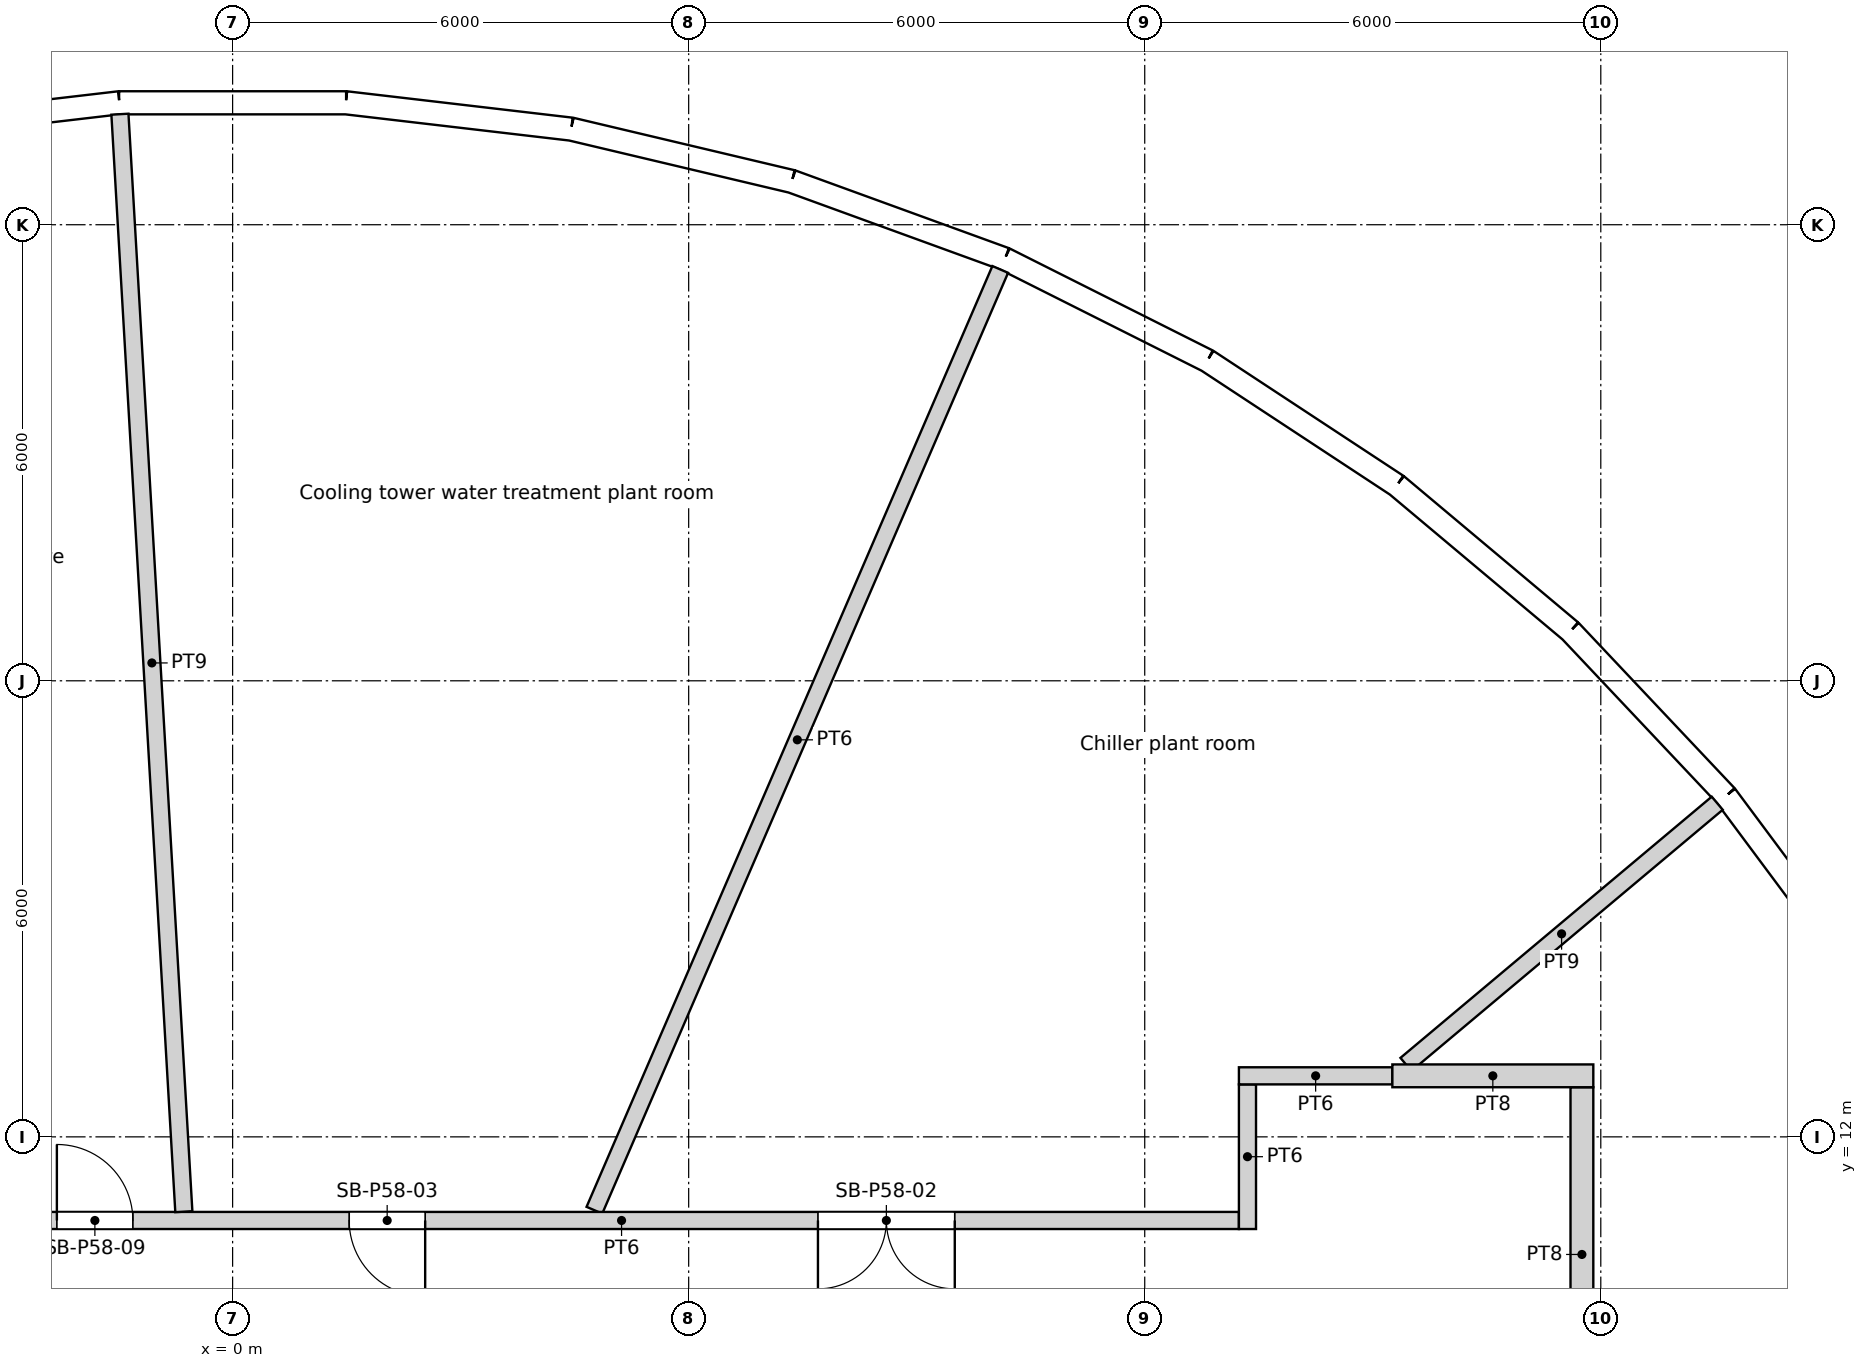
"""IFC4 building model, lengths in metres.
Left out: names, types, materials, properties, quantities, classifications, styles, units other than length and angle.
Written with IfcOpenShell. Run it as: python <this file> out.ifc"""

import sys

from ifc_helpers import new_model, si_unit, direction, frame, frame_2d, origin, origin_2d, place, context, subcontext, project, spatial, rectangle, circle, extrude, element, fill, save


model = new_model("IFC4")
c1 = context("Model", 3, precision=1e-05, world=origin(), true_north=direction((0.0, 1.0)))
c2 = subcontext(c1, "Body", "Model", "MODEL_VIEW")
j1 = project(units=[si_unit("LENGTHUNIT", "METRE"), si_unit("PLANEANGLEUNIT", "RADIAN")], contexts=[c1])
p1 = place(None, origin())
s1 = spatial("IfcSite", under=j1, at=p1, CompositionType="ELEMENT")
p2 = place(p1, origin())
s2 = spatial("IfcBuilding", under=s1, at=p2, CompositionType="ELEMENT")
p3 = place(p2, frame((0.0, 0.0, 225.0)))
s3 = spatial("IfcBuildingStorey", under=s2, at=p3, CompositionType="ELEMENT", Elevation=225.0)
for number, where, z_axis, x_axis in (
    (1, (18.805, 15.779, 0.0), (0.0, 0.0, 1.0), (1.0, 0.0, 0.0)),
    (2, (14.659, 19.69, 0.0), (0.0, 0.0, 1.0), (1.0, 0.0, 0.0)),
    (3, (9.723, 22.54, 0.0), (0.0, 0.0, 1.0), (1.0, 0.0, 0.0)),
    (4, (4.263, 24.175, 0.0), (0.0, 0.0, 1.0), (1.0, 0.0, 0.0)),
    (5, (-1.427, 24.506, 0.0), (0.0, 0.0, 1.0), (1.0, 0.0, 0.0)),
):
    element("IfcColumn", number, at=place(p3, frame(where, z_axis=z_axis, x_axis=x_axis)), inside=s3, PredefinedType="COLUMN", context=c2, shape_type="SweptSolid", body=[
        extrude(circle(Radius=0.6, at=origin_2d()), origin(), (0.0, 0.0, 1.0), 6.0),
    ])
for number, where, z_axis, x_axis in (
    (6, (15.552, 10.603, 0.0), (0.0, 0.0, 1.0), (1.0, 0.0, 0.0)),
    (7, (11.735, 14.716, 0.0), (0.0, 0.0, 1.0), (1.0, 0.0, 0.0)),
    (8, (6.876, 17.521, 0.0), (0.0, 0.0, 1.0), (1.0, 0.0, 0.0)),
    (9, (1.406, 18.77, 0.0), (0.0, 0.0, 1.0), (1.0, 0.0, 0.0)),
):
    element("IfcColumn", number, at=place(p3, frame(where, z_axis=z_axis, x_axis=x_axis)), inside=s3, PredefinedType="COLUMN", context=c2, shape_type="SweptSolid", body=[
        extrude(circle(Radius=0.65, at=origin_2d()), origin(), (0.0, 0.0, 1.0), 6.0),
    ])
p4 = place(p3, frame((21.428, 14.094, 0.0), z_axis=(0.0, 0.0, 1.0), x_axis=(-0.597206768034, 0.802087324557, 0.0)))
e10 = element("IfcWall", 10, at=p4, inside=s3, PredefinedType="SOLIDWALL", context=c2, shape_type="SweptSolid", body=[
    extrude(rectangle(XDim=2.983, YDim=0.3, at=frame_2d((1.491, 0.0))), origin(), (0.0, 0.0, 1.0), 5.65),
])
p5 = place(p4, frame((1.491, 0.0, 1.825)))
e11 = element("IfcOpeningElement", 11, at=p5, cuts=e10, PredefinedType="OPENING", context=c2, shape_type="SweptSolid", body=[
    extrude(circle(Radius=1.2, at=origin_2d()), frame((0.0, 0.16, 0.0), z_axis=(0.0, -1.0, 0.0), x_axis=(1.0, 0.0, 0.0)), (0.0, 0.0, 1.0), 0.32),
])
p6 = place(p3, frame((19.647, 16.486, 0.0), z_axis=(0.0, 0.0, 1.0), x_axis=(-0.686219609698, 0.72739442345, 0.0)))
e12 = element("IfcWall", 12, at=p6, inside=s3, PredefinedType="SOLIDWALL", context=c2, shape_type="SweptSolid", body=[
    extrude(rectangle(XDim=2.982, YDim=0.3, at=frame_2d((1.491, 0.0))), origin(), (0.0, 0.0, 1.0), 5.65),
])
p7 = place(p6, frame((1.491, 0.0, 1.825)))
e13 = element("IfcOpeningElement", 13, at=p7, cuts=e12, PredefinedType="OPENING", context=c2, shape_type="SweptSolid", body=[
    extrude(circle(Radius=1.2, at=origin_2d()), frame((0.0, 0.16, 0.0), z_axis=(0.0, -1.0, 0.0), x_axis=(1.0, 0.0, 0.0)), (0.0, 0.0, 1.0), 0.32),
])
p8 = place(p3, frame((17.6, 18.655, 0.0), z_axis=(0.0, 0.0, 1.0), x_axis=(-0.766015999952, 0.64282150541, 0.0)))
e14 = element("IfcWall", 14, at=p8, inside=s3, PredefinedType="SOLIDWALL", context=c2, shape_type="SweptSolid", body=[
    extrude(rectangle(XDim=2.982, YDim=0.3, at=frame_2d((1.491, 0.0))), origin(), (0.0, 0.0, 1.0), 5.65),
])
p9 = place(p8, frame((1.491, 0.0, 1.825)))
e15 = element("IfcOpeningElement", 15, at=p9, cuts=e14, PredefinedType="OPENING", context=c2, shape_type="SweptSolid", body=[
    extrude(circle(Radius=1.2, at=origin_2d()), frame((0.0, 0.16, 0.0), z_axis=(0.0, -1.0, 0.0), x_axis=(1.0, 0.0, 0.0)), (0.0, 0.0, 1.0), 0.32),
])
p10 = place(p3, frame((15.316, 20.573, 0.0), z_axis=(0.0, 0.0, 1.0), x_axis=(-0.835497187922, 0.549494721517, 0.0)))
e16 = element("IfcWall", 16, at=p10, inside=s3, PredefinedType="SOLIDWALL", context=c2, shape_type="SweptSolid", body=[
    extrude(rectangle(XDim=2.983, YDim=0.3, at=frame_2d((1.491, 0.0))), origin(), (0.0, 0.0, 1.0), 5.65),
])
p11 = place(p10, frame((1.491, 0.0, 1.825)))
e17 = element("IfcOpeningElement", 17, at=p11, cuts=e16, PredefinedType="OPENING", context=c2, shape_type="SweptSolid", body=[
    extrude(circle(Radius=1.2, at=origin_2d()), frame((0.0, 0.16, 0.0), z_axis=(0.0, -1.0, 0.0), x_axis=(1.0, 0.0, 0.0)), (0.0, 0.0, 1.0), 0.32),
])
p12 = place(p3, frame((12.824, 22.211, 0.0), z_axis=(0.0, 0.0, 1.0), x_axis=(-0.893656390984, 0.448751885626, 0.0)))
e18 = element("IfcWall", 18, at=p12, inside=s3, PredefinedType="SOLIDWALL", context=c2, shape_type="SweptSolid", body=[
    extrude(rectangle(XDim=2.982, YDim=0.3, at=frame_2d((1.491, 0.0))), origin(), (0.0, 0.0, 1.0), 5.65),
])
p13 = place(p12, frame((1.491, 0.0, 1.825)))
e19 = element("IfcOpeningElement", 19, at=p13, cuts=e18, PredefinedType="OPENING", context=c2, shape_type="SweptSolid", body=[
    extrude(circle(Radius=1.2, at=origin_2d()), frame((0.0, 0.16, 0.0), z_axis=(0.0, -1.0, 0.0), x_axis=(1.0, 0.0, 0.0)), (0.0, 0.0, 1.0), 0.32),
])
p14 = place(p3, frame((10.158, 23.55, 0.0), z_axis=(0.0, 0.0, 1.0), x_axis=(-0.939676264274, 0.342065079129, 0.0)))
e20 = element("IfcWall", 20, at=p14, inside=s3, PredefinedType="SOLIDWALL", context=c2, shape_type="SweptSolid", body=[
    extrude(rectangle(XDim=2.983, YDim=0.3, at=frame_2d((1.491, 0.0))), origin(), (0.0, 0.0, 1.0), 5.65),
])
p15 = place(p14, frame((1.491, 0.0, 1.825)))
e21 = element("IfcOpeningElement", 21, at=p15, cuts=e20, PredefinedType="OPENING", context=c2, shape_type="SweptSolid", body=[
    extrude(circle(Radius=1.2, at=origin_2d()), frame((0.0, 0.16, 0.0), z_axis=(0.0, -1.0, 0.0), x_axis=(1.0, 0.0, 0.0)), (0.0, 0.0, 1.0), 0.32),
])
p16 = place(p3, frame((7.356, 24.57, 0.0), z_axis=(0.0, 0.0, 1.0), x_axis=(-0.973049843813, 0.230594886012, 0.0)))
e22 = element("IfcWall", 22, at=p16, inside=s3, PredefinedType="SOLIDWALL", context=c2, shape_type="SweptSolid", body=[
    extrude(rectangle(XDim=2.982, YDim=0.3, at=frame_2d((1.491, 0.0))), origin(), (0.0, 0.0, 1.0), 5.65),
])
p17 = place(p16, frame((1.491, 0.0, 1.825)))
e23 = element("IfcOpeningElement", 23, at=p17, cuts=e22, PredefinedType="OPENING", context=c2, shape_type="SweptSolid", body=[
    extrude(circle(Radius=1.2, at=origin_2d()), frame((0.0, 0.16, 0.0), z_axis=(0.0, -1.0, 0.0), x_axis=(1.0, 0.0, 0.0)), (0.0, 0.0, 1.0), 0.32),
])
p18 = place(p3, frame((4.454, 25.258, 0.0), z_axis=(0.0, 0.0, 1.0), x_axis=(-0.993240822844, 0.116071821888, 0.0)))
e24 = element("IfcWall", 24, at=p18, inside=s3, PredefinedType="SOLIDWALL", context=c2, shape_type="SweptSolid", body=[
    extrude(rectangle(XDim=2.983, YDim=0.3, at=frame_2d((1.491, 0.0))), origin(), (0.0, 0.0, 1.0), 5.65),
])
p19 = place(p18, frame((1.491, 0.0, 1.825)))
e25 = element("IfcOpeningElement", 25, at=p19, cuts=e24, PredefinedType="OPENING", context=c2, shape_type="SweptSolid", body=[
    extrude(circle(Radius=1.2, at=origin_2d()), frame((0.0, 0.16, 0.0), z_axis=(0.0, -1.0, 0.0), x_axis=(1.0, 0.0, 0.0)), (0.0, 0.0, 1.0), 0.32),
])
p20 = place(p3, frame((1.491, 25.604, 0.0), z_axis=(0.0, 0.0, 1.0), x_axis=(-1.0, 0.0, 0.0)))
e26 = element("IfcWall", 26, at=p20, inside=s3, PredefinedType="SOLIDWALL", context=c2, shape_type="SweptSolid", body=[
    extrude(rectangle(XDim=2.982, YDim=0.3, at=frame_2d((1.491, 0.0))), origin(), (0.0, 0.0, 1.0), 5.65),
])
p21 = place(p20, frame((1.491, 0.0, 1.825)))
e27 = element("IfcOpeningElement", 27, at=p21, cuts=e26, PredefinedType="OPENING", context=c2, shape_type="SweptSolid", body=[
    extrude(circle(Radius=1.2, at=origin_2d()), frame((0.0, 0.16, 0.0), z_axis=(0.0, -1.0, 0.0), x_axis=(1.0, 0.0, 0.0)), (0.0, 0.0, 1.0), 0.32),
])
p22 = place(p3, frame((-1.491, 25.604, 0.0), z_axis=(0.0, 0.0, 1.0), x_axis=(-0.993240822844, -0.116071821888, 0.0)))
e28 = element("IfcWall", 28, at=p22, inside=s3, PredefinedType="SOLIDWALL", context=c2, shape_type="SweptSolid", body=[
    extrude(rectangle(XDim=2.983, YDim=0.3, at=frame_2d((1.491, 0.0))), origin(), (0.0, 0.0, 1.0), 5.65),
])
p23 = place(p22, frame((1.491, 0.0, 1.825)))
e29 = element("IfcOpeningElement", 29, at=p23, cuts=e28, PredefinedType="OPENING", context=c2, shape_type="SweptSolid", body=[
    extrude(circle(Radius=1.2, at=origin_2d()), frame((0.0, 0.16, 0.0), z_axis=(0.0, -1.0, 0.0), x_axis=(1.0, 0.0, 0.0)), (0.0, 0.0, 1.0), 0.32),
])
p24 = place(p3, frame((-1.482, 25.454, 0.0), z_axis=(0.0, 0.0, 1.0), x_axis=(0.058137182414, -0.9983086036, 0.0)))
e30 = element("IfcWall", 30, at=p24, inside=s3, PredefinedType="PARTITIONING", context=c2, shape_type="SweptSolid", body=[
    extrude(rectangle(XDim=14.463, YDim=0.225, at=frame_2d((7.231, 0.0))), origin(), (0.0, 0.0, 1.0), 2.7),
])
p25 = place(p3, frame((10.099, 23.412, 0.0), z_axis=(0.0, 0.0, 1.0), x_axis=(-0.396077936738, -0.918216895961, 0.0)))
e31 = element("IfcWall", 31, at=p25, inside=s3, PredefinedType="PARTITIONING", context=c2, shape_type="SweptSolid", body=[
    extrude(rectangle(XDim=13.479, YDim=0.225, at=frame_2d((6.74, 0.0))), origin(), (0.0, 0.0, 1.0), 5.2),
])
p26 = place(p3, frame((13.239, 10.9, 0.0), z_axis=(0.0, 0.0, 1.0), x_axis=(-1.0, 0.0, 0.0)))
e32 = element("IfcWall", 32, at=p26, inside=s3, PredefinedType="PARTITIONING", context=c2, shape_type="SweptSolid", body=[
    extrude(rectangle(XDim=16.228, YDim=0.225, at=frame_2d((8.114, 0.0))), origin(), (0.0, 0.0, 1.0), 5.2),
])
p27 = place(p26, frame((3.738, 0.0, 0.0)))
e33 = element("IfcOpeningElement", 33, at=p27, cuts=e32, PredefinedType="OPENING", context=c2, shape_type="SweptSolid", body=[
    extrude(rectangle(XDim=1.8, YDim=2.4, at=frame_2d((0.9, 1.2))), frame((0.0, 0.113, 0.0), z_axis=(0.0, -1.0, 0.0), x_axis=(1.0, 0.0, 0.0)), (0.0, 0.0, 1.0), 0.225),
])
p28 = place(p26, frame((10.706, 0.0, 0.0)))
e34 = element("IfcOpeningElement", 34, at=p28, cuts=e32, PredefinedType="OPENING", context=c2, shape_type="SweptSolid", body=[
    extrude(rectangle(XDim=1.0, YDim=2.1, at=frame_2d((0.5, 1.05))), frame((0.0, 0.113, 0.0), z_axis=(0.0, -1.0, 0.0), x_axis=(1.0, 0.0, 0.0)), (0.0, 0.0, 1.0), 0.225),
])
p29 = place(p26, frame((14.551, 0.0, 0.0)))
e35 = element("IfcOpeningElement", 35, at=p29, cuts=e32, PredefinedType="OPENING", context=c2, shape_type="SweptSolid", body=[
    extrude(rectangle(XDim=1.0, YDim=2.1, at=frame_2d((0.5, 1.05))), frame((0.0, 0.113, 0.0), z_axis=(0.0, -1.0, 0.0), x_axis=(1.0, 0.0, 0.0)), (0.0, 0.0, 1.0), 0.225),
])
p30 = place(p3, frame((13.352, 12.69, 0.0), z_axis=(0.0, 0.0, 1.0), x_axis=(0.0, -1.0, 0.0)))
e36 = element("IfcWall", 36, at=p30, inside=s3, PredefinedType="PARTITIONING", context=c2, shape_type="SweptSolid", body=[
    extrude(rectangle(XDim=1.903, YDim=0.225, at=frame_2d((0.951, 0.0))), origin(), (0.0, 0.0, 1.0), 5.2),
])
p31 = place(p3, frame((15.258, 12.803, 0.0), z_axis=(0.0, 0.0, 1.0), x_axis=(-1.0, 0.0, 0.0)))
e37 = element("IfcWall", 37, at=p31, inside=s3, PredefinedType="PARTITIONING", context=c2, shape_type="SweptSolid", body=[
    extrude(rectangle(XDim=2.019, YDim=0.225, at=frame_2d((1.009, 0.0))), origin(), (0.0, 0.0, 1.0), 5.2),
])
p32 = place(p3, frame((17.752, 8.253, 0.0), z_axis=(0.0, 0.0, 1.0), x_axis=(0.0, 1.0, 0.0)))
e38 = element("IfcWall", 38, at=p32, inside=s3, PredefinedType="PARTITIONING", context=c2, shape_type="SweptSolid", body=[
    extrude(rectangle(XDim=4.4, YDim=0.3, at=frame_2d((2.2, 0.0))), origin(), (0.0, 0.0, 1.0), 5.2),
])
p33 = place(p3, frame((17.902, 12.803, 0.0), z_axis=(0.0, 0.0, 1.0), x_axis=(-1.0, 0.0, 0.0)))
e39 = element("IfcWall", 39, at=p33, inside=s3, PredefinedType="PARTITIONING", context=c2, shape_type="SweptSolid", body=[
    extrude(rectangle(XDim=2.644, YDim=0.3, at=frame_2d((1.322, 0.0))), origin(), (0.0, 0.0, 1.0), 5.2),
])
p34 = place(p3, frame((19.532, 16.389, 0.0), z_axis=(0.0, 0.0, 1.0), x_axis=(-0.766023242491, -0.642812874765, 0.0)))
e40 = element("IfcWall", 40, at=p34, inside=s3, PredefinedType="PARTITIONING", context=c2, shape_type="SweptSolid", body=[
    extrude(rectangle(XDim=5.346, YDim=0.225, at=frame_2d((2.673, 0.0))), origin(), (0.0, 0.0, 1.0), 2.7),
])
p35 = place(p5, origin())
e41 = element("IfcWindow", 41, at=p35, inside=s3, PartitioningType="SINGLE_PANEL", PredefinedType="WINDOW", context=c2, shape_type="SweptSolid", body=[
    extrude(circle(Radius=1.2, at=origin_2d()), frame((0.0, 0.12, 0.0), z_axis=(0.0, -1.0, 0.0), x_axis=(1.0, 0.0, 0.0)), (0.0, 0.0, 1.0), 0.1),
])
fill(e11, e41)
p36 = place(p7, origin())
e42 = element("IfcWindow", 42, at=p36, inside=s3, PartitioningType="SINGLE_PANEL", PredefinedType="WINDOW", context=c2, shape_type="SweptSolid", body=[
    extrude(circle(Radius=1.2, at=origin_2d()), frame((0.0, 0.12, 0.0), z_axis=(0.0, -1.0, 0.0), x_axis=(1.0, 0.0, 0.0)), (0.0, 0.0, 1.0), 0.1),
])
fill(e13, e42)
p37 = place(p9, origin())
e43 = element("IfcWindow", 43, at=p37, inside=s3, PartitioningType="SINGLE_PANEL", PredefinedType="WINDOW", context=c2, shape_type="SweptSolid", body=[
    extrude(circle(Radius=1.2, at=origin_2d()), frame((0.0, 0.12, 0.0), z_axis=(0.0, -1.0, 0.0), x_axis=(1.0, 0.0, 0.0)), (0.0, 0.0, 1.0), 0.1),
])
fill(e15, e43)
p38 = place(p11, origin())
e44 = element("IfcWindow", 44, at=p38, inside=s3, PartitioningType="SINGLE_PANEL", PredefinedType="WINDOW", context=c2, shape_type="SweptSolid", body=[
    extrude(circle(Radius=1.2, at=origin_2d()), frame((0.0, 0.12, 0.0), z_axis=(0.0, -1.0, 0.0), x_axis=(1.0, 0.0, 0.0)), (0.0, 0.0, 1.0), 0.1),
])
fill(e17, e44)
p39 = place(p13, origin())
e45 = element("IfcWindow", 45, at=p39, inside=s3, PartitioningType="SINGLE_PANEL", PredefinedType="WINDOW", context=c2, shape_type="SweptSolid", body=[
    extrude(circle(Radius=1.2, at=origin_2d()), frame((0.0, 0.12, 0.0), z_axis=(0.0, -1.0, 0.0), x_axis=(1.0, 0.0, 0.0)), (0.0, 0.0, 1.0), 0.1),
])
fill(e19, e45)
p40 = place(p15, origin())
e46 = element("IfcWindow", 46, at=p40, inside=s3, PartitioningType="SINGLE_PANEL", PredefinedType="WINDOW", context=c2, shape_type="SweptSolid", body=[
    extrude(circle(Radius=1.2, at=origin_2d()), frame((0.0, 0.12, 0.0), z_axis=(0.0, -1.0, 0.0), x_axis=(1.0, 0.0, 0.0)), (0.0, 0.0, 1.0), 0.1),
])
fill(e21, e46)
p41 = place(p17, origin())
e47 = element("IfcWindow", 47, at=p41, inside=s3, PartitioningType="SINGLE_PANEL", PredefinedType="WINDOW", context=c2, shape_type="SweptSolid", body=[
    extrude(circle(Radius=1.2, at=origin_2d()), frame((0.0, 0.12, 0.0), z_axis=(0.0, -1.0, 0.0), x_axis=(1.0, 0.0, 0.0)), (0.0, 0.0, 1.0), 0.1),
])
fill(e23, e47)
p42 = place(p19, origin())
e48 = element("IfcWindow", 48, at=p42, inside=s3, PartitioningType="SINGLE_PANEL", PredefinedType="WINDOW", context=c2, shape_type="SweptSolid", body=[
    extrude(circle(Radius=1.2, at=origin_2d()), frame((0.0, 0.12, 0.0), z_axis=(0.0, -1.0, 0.0), x_axis=(1.0, 0.0, 0.0)), (0.0, 0.0, 1.0), 0.1),
])
fill(e25, e48)
p43 = place(p21, origin())
e49 = element("IfcWindow", 49, at=p43, inside=s3, PartitioningType="SINGLE_PANEL", PredefinedType="WINDOW", context=c2, shape_type="SweptSolid", body=[
    extrude(circle(Radius=1.2, at=origin_2d()), frame((0.0, 0.12, 0.0), z_axis=(0.0, -1.0, 0.0), x_axis=(1.0, 0.0, 0.0)), (0.0, 0.0, 1.0), 0.1),
])
fill(e27, e49)
p44 = place(p23, origin())
e50 = element("IfcWindow", 50, at=p44, inside=s3, PartitioningType="SINGLE_PANEL", PredefinedType="WINDOW", context=c2, shape_type="SweptSolid", body=[
    extrude(circle(Radius=1.2, at=origin_2d()), frame((0.0, 0.12, 0.0), z_axis=(0.0, -1.0, 0.0), x_axis=(1.0, 0.0, 0.0)), (0.0, 0.0, 1.0), 0.1),
])
fill(e29, e50)
p45 = place(p27, origin())
e51 = element("IfcDoor", 51, at=p45, inside=s3, OperationType="DOUBLE_DOOR_SINGLE_SWING", PredefinedType="DOOR", context=c2, shape_type="SweptSolid", body=[
    extrude(rectangle(XDim=1.8, YDim=2.4, at=frame_2d((0.9, 1.2))), frame((0.0, 0.025, 0.0), z_axis=(0.0, -1.0, 0.0), x_axis=(1.0, 0.0, 0.0)), (0.0, 0.0, 1.0), 0.05),
])
fill(e33, e51)
p46 = place(p28, origin())
e52 = element("IfcDoor", 52, at=p46, inside=s3, OperationType="SINGLE_SWING_LEFT", PredefinedType="DOOR", context=c2, shape_type="SweptSolid", body=[
    extrude(rectangle(XDim=1.0, YDim=2.1, at=frame_2d((0.5, 1.05))), frame((0.0, 0.025, 0.0), z_axis=(0.0, -1.0, 0.0), x_axis=(1.0, 0.0, 0.0)), (0.0, 0.0, 1.0), 0.05),
])
fill(e34, e52)
p47 = place(p29, origin())
e53 = element("IfcDoor", 53, at=p47, inside=s3, OperationType="SINGLE_SWING_LEFT", PredefinedType="DOOR", context=c2, shape_type="SweptSolid", body=[
    extrude(rectangle(XDim=1.0, YDim=2.1, at=frame_2d((0.5, 1.05))), frame((0.0, 0.025, 0.0), z_axis=(0.0, -1.0, 0.0), x_axis=(1.0, 0.0, 0.0)), (0.0, 0.0, 1.0), 0.05),
])
fill(e35, e53)
save(model, sys.argv[1])
